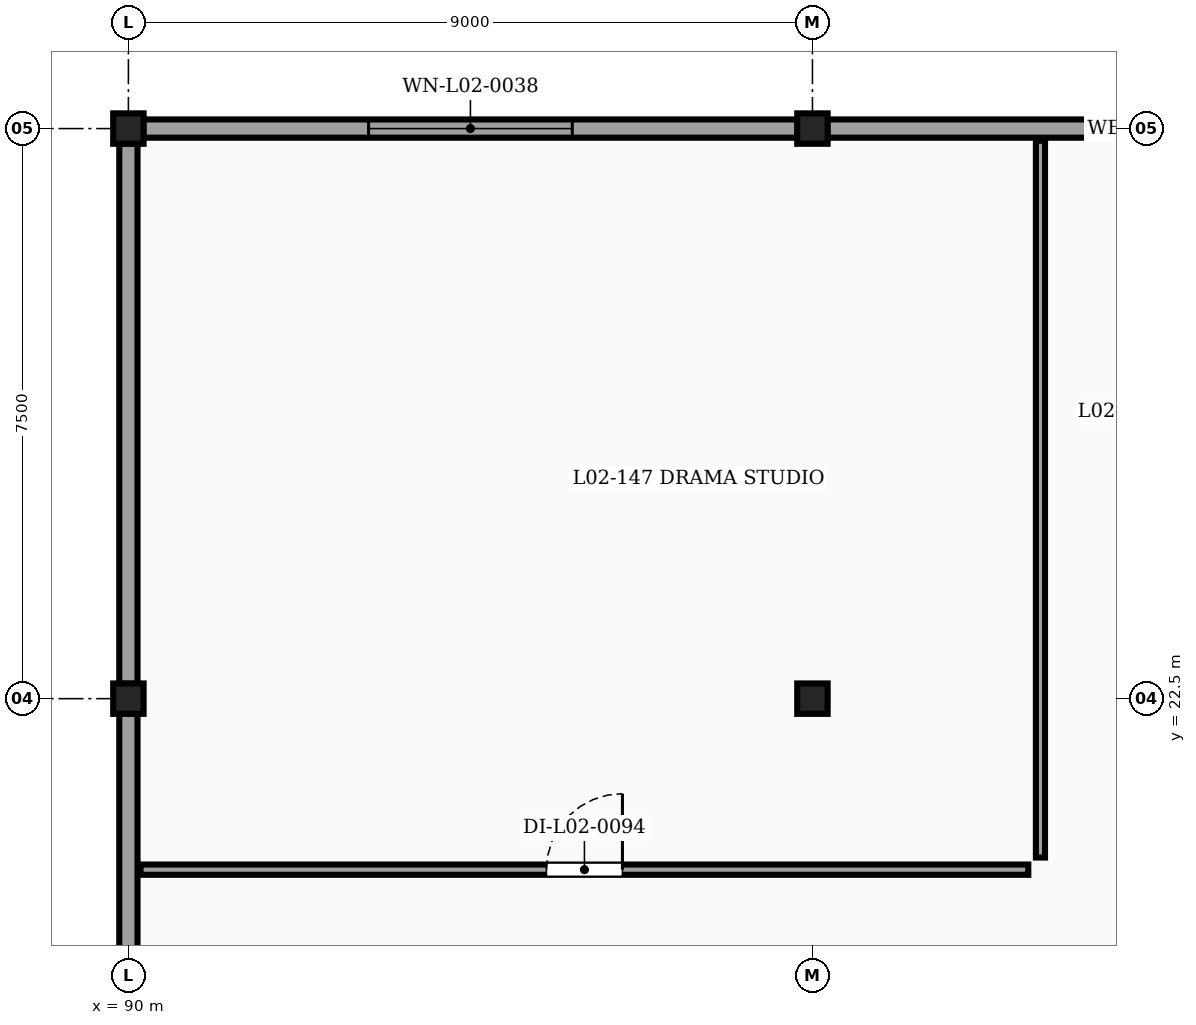
"""IFC4 building model, lengths in metres.
Left out: names, types, materials, properties, quantities, classifications, styles, units other than length and angle.
Written with IfcOpenShell. Run it as: python <this file> out.ifc"""

import sys

from ifc_helpers import new_model, si_unit, direction, frame, frame_2d, origin, origin_2d, place, context, subcontext, project, spatial, rectangle, extrude, element, fill, save


model = new_model("IFC4")
c1 = context("Model", 3, precision=1e-05, world=origin(), true_north=direction((0.0, 1.0)))
c2 = subcontext(c1, "Body", "Model", "MODEL_VIEW")
j1 = project(units=[si_unit("LENGTHUNIT", "METRE"), si_unit("PLANEANGLEUNIT", "RADIAN")], contexts=[c1])
p1 = place(None, origin())
s1 = spatial("IfcSite", under=j1, at=p1, CompositionType="ELEMENT")
p2 = place(p1, origin())
s2 = spatial("IfcBuilding", under=s1, at=p2, CompositionType="ELEMENT")
p3 = place(p2, frame((0.0, 0.0, 8.5)))
s3 = spatial("IfcBuildingStorey", under=s2, at=p3, CompositionType="ELEMENT", Elevation=8.5)
for number, where, z_axis, x_axis in (
    (1, (90.0, 22.5, 0.0), (0.0, 0.0, 1.0), (1.0, 0.0, 0.0)),
    (2, (99.0, 22.5, 0.0), (0.0, 0.0, 1.0), (1.0, 0.0, 0.0)),
    (3, (90.0, 30.0, 0.0), (0.0, 0.0, 1.0), (1.0, 0.0, 0.0)),
    (4, (99.0, 30.0, 0.0), (0.0, 0.0, 1.0), (1.0, 0.0, 0.0)),
):
    element("IfcColumn", number, at=place(p3, frame(where, z_axis=z_axis, x_axis=x_axis)), inside=s3, PredefinedType="COLUMN", context=c2, shape_type="SweptSolid", body=[
        extrude(rectangle(XDim=0.4, YDim=0.4, at=origin_2d()), origin(), (0.0, 0.0, 1.0), 3.42),
    ])
p4 = place(p3, frame((90.196, 30.0, 0.0), z_axis=(0.0, 0.0, 1.0), x_axis=(1.0, 0.0, 0.0)))
e5 = element("IfcWall", 5, at=p4, inside=s3, PredefinedType="SOLIDWALL", context=c2, shape_type="SweptSolid", body=[
    extrude(rectangle(XDim=8.608, YDim=0.24, at=frame_2d((4.304, 0.0))), origin(), (0.0, 0.0, 1.0), 2.827),
])
p5 = place(p4, frame((2.964, 0.0, 0.95)))
e6 = element("IfcOpeningElement", 6, at=p5, cuts=e5, PredefinedType="OPENING", context=c2, shape_type="SweptSolid", body=[
    extrude(rectangle(XDim=2.68, YDim=1.54, at=frame_2d((1.34, 0.77))), frame((0.0, 0.13, 0.0), z_axis=(0.0, -1.0, 0.0), x_axis=(1.0, 0.0, 0.0)), (0.0, 0.0, 1.0), 0.26),
])
p6 = place(p3, frame((99.196, 30.0, 0.0), z_axis=(0.0, 0.0, 1.0), x_axis=(1.0, 0.0, 0.0)))
e7 = element("IfcWall", 7, at=p6, inside=s3, PredefinedType="SOLIDWALL", context=c2, shape_type="SweptSolid", body=[
    extrude(rectangle(XDim=8.608, YDim=0.24, at=frame_2d((4.304, 0.0))), origin(), (0.0, 0.0, 1.0), 2.827),
])
for number, where, z_axis, x_axis in (
    (8, (90.0, 15.196, 0.0), (0.0, 0.0, 1.0), (0.0, 1.0, 0.0)),
    (9, (90.0, 22.696, 0.0), (0.0, 0.0, 1.0), (0.0, 1.0, 0.0)),
):
    element("IfcWall", number, at=place(p3, frame(where, z_axis=z_axis, x_axis=x_axis)), inside=s3, PredefinedType="SOLIDWALL", context=c2, shape_type="SweptSolid", body=[
        extrude(rectangle(XDim=7.108, YDim=0.24, at=frame_2d((3.554, 0.0))), origin(), (0.0, 0.0, 1.0), 2.827),
    ])
p7 = place(p3, frame((90.16, 20.25, 0.0), z_axis=(0.0, 0.0, 1.0), x_axis=(1.0, 0.0, 0.0)))
e10 = element("IfcWall", 10, at=p7, inside=s3, PredefinedType="PARTITIONING", context=c2, shape_type="SweptSolid", body=[
    extrude(rectangle(XDim=11.68, YDim=0.135, at=frame_2d((5.84, 0.0))), origin(), (0.0, 0.0, 1.0), 3.42),
])
p8 = place(p7, frame((5.34, 0.0, 0.0)))
e11 = element("IfcOpeningElement", 11, at=p8, cuts=e10, PredefinedType="OPENING", context=c2, shape_type="SweptSolid", body=[
    extrude(rectangle(XDim=1.0, YDim=2.15, at=frame_2d((0.5, 1.075))), frame((0.0, 0.077, 0.0), z_axis=(0.0, -1.0, 0.0), x_axis=(1.0, 0.0, 0.0)), (0.0, 0.0, 1.0), 0.155),
])
p9 = place(p3, frame((102.0, 20.41, 0.0), z_axis=(0.0, 0.0, 1.0), x_axis=(0.0, 1.0, 0.0)))
e12 = element("IfcWall", 12, at=p9, inside=s3, PredefinedType="PARTITIONING", context=c2, shape_type="SweptSolid", body=[
    extrude(rectangle(XDim=9.43, YDim=0.12, at=frame_2d((4.715, 0.0))), origin(), (0.0, 0.0, 1.0), 3.112),
])
p10 = place(p5, origin())
e13 = element("IfcWindow", 13, at=p10, inside=s3, PartitioningType="DOUBLE_PANEL_VERTICAL", PredefinedType="WINDOW", context=c2, shape_type="SweptSolid", body=[
    extrude(rectangle(XDim=2.68, YDim=1.54, at=frame_2d((1.34, 0.77))), frame((0.0, 0.03, 0.0), z_axis=(0.0, -1.0, 0.0), x_axis=(1.0, 0.0, 0.0)), (0.0, 0.0, 1.0), 0.06),
])
fill(e6, e13)
p11 = place(p8, origin())
e14 = element("IfcDoor", 14, at=p11, inside=s3, OperationType="SINGLE_SWING_RIGHT", PredefinedType="DOOR", context=c2, shape_type="SweptSolid", body=[
    extrude(rectangle(XDim=1.0, YDim=2.15, at=frame_2d((0.5, 1.075))), frame((0.0, 0.025, 0.0), z_axis=(0.0, -1.0, 0.0), x_axis=(1.0, 0.0, 0.0)), (0.0, 0.0, 1.0), 0.05),
])
fill(e11, e14)
save(model, sys.argv[1])
